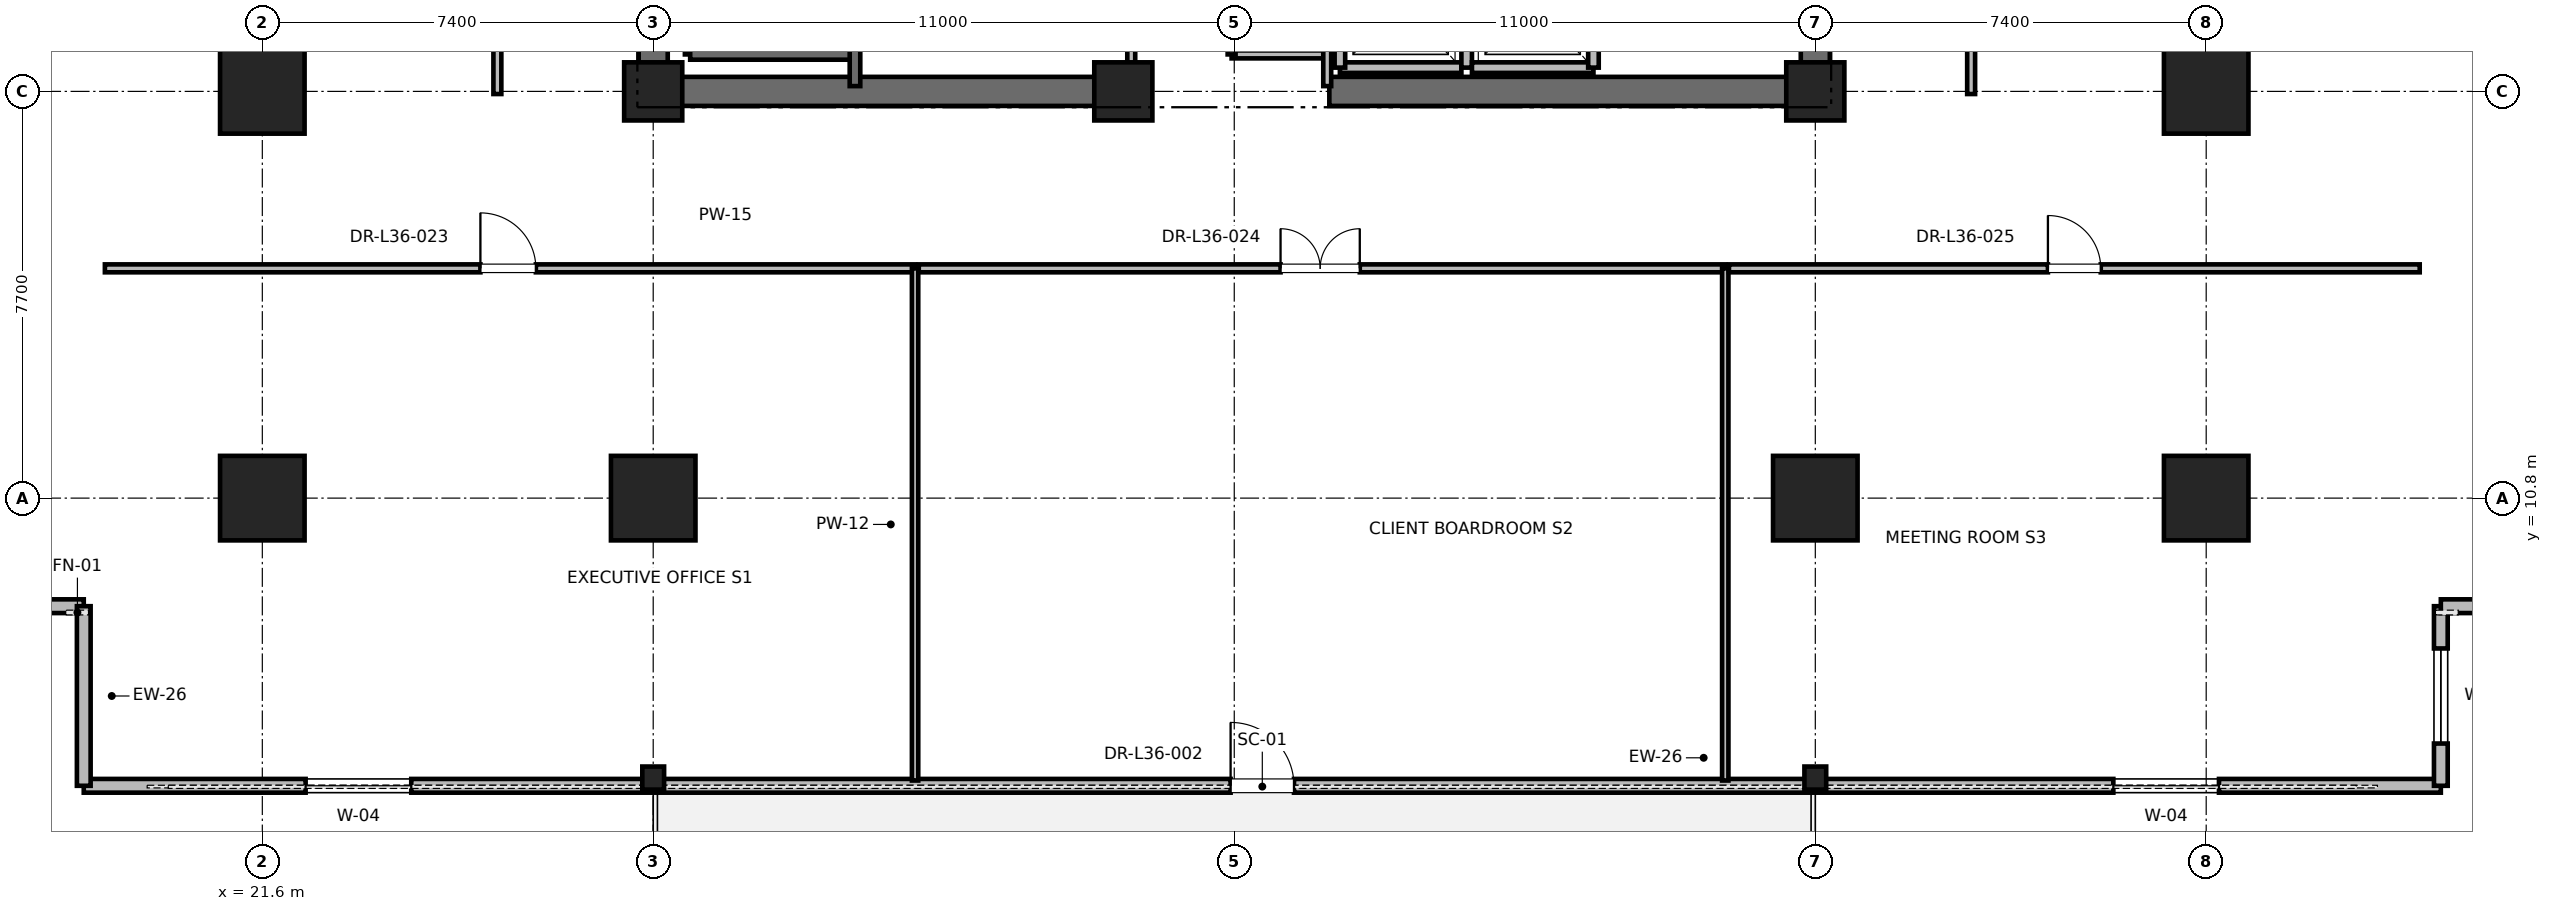
"""IFC4 building model, lengths in metres.
Left out: names, types, materials, properties, quantities, classifications, styles, units other than length and angle.
Written with IfcOpenShell. Run it as: python <this file> out.ifc"""

import sys

from ifc_helpers import new_model, si_unit, direction, frame, frame_2d, origin, origin_2d, place, context, subcontext, project, spatial, rectangle, i_section, extrude, element, fill, save


model = new_model("IFC4")
c1 = context("Model", 3, precision=1e-05, world=origin(), true_north=direction((0.0, 1.0)))
c2 = subcontext(c1, "Body", "Model", "MODEL_VIEW")
j1 = project(units=[si_unit("LENGTHUNIT", "METRE"), si_unit("PLANEANGLEUNIT", "RADIAN")], contexts=[c1])
p1 = place(None, origin())
s1 = spatial("IfcSite", under=j1, at=p1, CompositionType="ELEMENT")
p2 = place(p1, origin())
s2 = spatial("IfcBuilding", under=s1, at=p2, CompositionType="ELEMENT")
p3 = place(p2, frame((0.0, 0.0, 156.4)))
s3 = spatial("IfcBuildingStorey", under=s2, at=p3, CompositionType="ELEMENT", Elevation=156.4)
for number, where, z_axis, x_axis in (
    (1, (29.0, 10.8, 0.0), (0.0, 0.0, 1.0), (1.0, 0.0, 0.0)),
    (2, (51.0, 10.8, 0.0), (0.0, 0.0, 1.0), (1.0, 0.0, 0.0)),
    (3, (21.6, 18.5, 0.0), (0.0, 0.0, 1.0), (1.0, 0.0, 0.0)),
    (4, (58.4, 18.5, 0.0), (0.0, 0.0, 1.0), (1.0, 0.0, 0.0)),
    (5, (21.6, 10.8, 0.0), (0.0, 0.0, 1.0), (1.0, 0.0, 0.0)),
    (6, (58.4, 10.8, 0.0), (0.0, 0.0, 1.0), (1.0, 0.0, 0.0)),
):
    element("IfcColumn", number, at=place(p3, frame(where, z_axis=z_axis, x_axis=x_axis)), inside=s3, PredefinedType="COLUMN", context=c2, shape_type="SweptSolid", body=[
        extrude(rectangle(XDim=1.6, YDim=1.6, at=origin_2d()), origin(), (0.0, 0.0, 1.0), 4.0),
    ])
for number, where, z_axis, x_axis in (
    (7, (29.0, 5.5, 0.0), (0.0, 0.0, 1.0), (1.0, 0.0, 0.0)),
    (8, (51.0, 5.5, 0.0), (0.0, 0.0, 1.0), (1.0, 0.0, 0.0)),
):
    element("IfcColumn", number, at=place(p3, frame(where, z_axis=z_axis, x_axis=x_axis)), inside=s3, PredefinedType="COLUMN", context=c2, shape_type="SweptSolid", body=[
        extrude(i_section(OverallWidth=0.412, OverallDepth=0.437, WebThickness=0.036, FlangeThickness=0.058, FilletRadius=0.015, at=origin_2d()), origin(), (0.0, 0.0, 1.0), 4.0),
    ])
for number, where, z_axis, x_axis in (
    (9, (29.0, 18.5, 0.0), (0.0, 0.0, 1.0), (1.0, 0.0, 0.0)),
    (10, (51.0, 18.5, 0.0), (0.0, 0.0, 1.0), (1.0, 0.0, 0.0)),
    (11, (37.9, 18.5, 0.0), (0.0, 0.0, 1.0), (1.0, 0.0, 0.0)),
):
    element("IfcColumn", number, at=place(p3, frame(where, z_axis=z_axis, x_axis=x_axis)), inside=s3, PredefinedType="PILASTER", context=c2, shape_type="SweptSolid", body=[
        extrude(rectangle(XDim=1.1, YDim=1.1, at=origin_2d()), origin(), (0.0, 0.0, 1.0), 4.0),
    ])
for number, where, z_axis, x_axis in (
    (12, (29.0, 18.5, 0.0), (0.0, 0.0, 1.0), (1.0, 0.0, 0.0)),
    (13, (41.8, 18.5, 0.0), (0.0, 0.0, 1.0), (1.0, 0.0, 0.0)),
):
    element("IfcWall", number, at=place(p3, frame(where, z_axis=z_axis, x_axis=x_axis)), inside=s3, PredefinedType="SHEAR", context=c2, shape_type="SweptSolid", body=[
        extrude(rectangle(XDim=9.2, YDim=0.55, at=frame_2d((4.6, 0.0))), origin(), (0.0, 0.0, 1.0), 3.775),
    ])
p4 = place(p3, frame((29.0, 18.5, 0.0), z_axis=(0.0, 0.0, 1.0), x_axis=(0.0, 1.0, 0.0)))
e14 = element("IfcWall", 14, at=p4, inside=s3, PredefinedType="SHEAR", context=c2, shape_type="SweptSolid", body=[
    extrude(rectangle(XDim=8.8, YDim=0.55, at=frame_2d((4.4, 0.0))), origin(), (0.0, 0.0, 1.0), 3.775),
])
p5 = place(p3, frame((51.0, 18.5, 0.0), z_axis=(0.0, 0.0, 1.0), x_axis=(0.0, 1.0, 0.0)))
e15 = element("IfcWall", 15, at=p5, inside=s3, PredefinedType="SHEAR", context=c2, shape_type="SweptSolid", body=[
    extrude(rectangle(XDim=5.8, YDim=0.55, at=frame_2d((2.9, 0.0))), origin(), (0.0, 0.0, 1.0), 3.775),
])
p6 = place(p3, frame((18.22, 5.354, 0.0), z_axis=(0.0, 0.0, 1.0), x_axis=(1.0, 0.0, 0.0)))
e16 = element("IfcWall", 16, at=p6, inside=s3, PredefinedType="PARAPET", context=c2, shape_type="SweptSolid", body=[
    extrude(rectangle(XDim=44.622, YDim=0.26, at=frame_2d((22.311, 0.0))), origin(), (0.0, 0.0, 1.0), 2.97),
])
p7 = place(p6, frame((4.2, 0.0, 0.85)))
e17 = element("IfcOpeningElement", 17, at=p7, cuts=e16, PredefinedType="OPENING", context=c2, shape_type="SweptSolid", body=[
    extrude(rectangle(XDim=2.0, YDim=2.3, at=frame_2d((1.0, 1.15))), frame((0.0, 0.13, 0.0), z_axis=(0.0, -1.0, 0.0), x_axis=(1.0, 0.0, 0.0)), (0.0, 0.0, 1.0), 0.26),
])
p8 = place(p6, frame((21.711, 0.0, 0.0)))
e18 = element("IfcOpeningElement", 18, at=p8, cuts=e16, PredefinedType="OPENING", context=c2, shape_type="SweptSolid", body=[
    extrude(rectangle(XDim=1.2, YDim=2.2, at=frame_2d((0.6, 1.1))), frame((0.0, 0.13, 0.0), z_axis=(0.0, -1.0, 0.0), x_axis=(1.0, 0.0, 0.0)), (0.0, 0.0, 1.0), 0.26),
])
p9 = place(p6, frame((38.422, 0.0, 0.85)))
e19 = element("IfcOpeningElement", 19, at=p9, cuts=e16, PredefinedType="OPENING", context=c2, shape_type="SweptSolid", body=[
    extrude(rectangle(XDim=2.0, YDim=2.3, at=frame_2d((1.0, 1.15))), frame((0.0, 0.13, 0.0), z_axis=(0.0, -1.0, 0.0), x_axis=(1.0, 0.0, 0.0)), (0.0, 0.0, 1.0), 0.26),
])
p10 = place(p3, frame((14.42, 8.754, 0.0), z_axis=(0.0, 0.0, 1.0), x_axis=(1.0, 0.0, 0.0)))
e20 = element("IfcWall", 20, at=p10, inside=s3, PredefinedType="PARAPET", context=c2, shape_type="SweptSolid", body=[
    extrude(rectangle(XDim=3.8, YDim=0.26, at=frame_2d((1.9, 0.0))), origin(), (0.0, 0.0, 1.0), 3.775),
])
p11 = place(p10, frame((1.0, 0.0, 0.85)))
e21 = element("IfcOpeningElement", 21, at=p11, cuts=e20, PredefinedType="OPENING", context=c2, shape_type="SweptSolid", body=[
    extrude(rectangle(XDim=1.8, YDim=2.2, at=frame_2d((0.9, 1.1))), frame((0.0, 0.13, 0.0), z_axis=(0.0, -1.0, 0.0), x_axis=(1.0, 0.0, 0.0)), (0.0, 0.0, 1.0), 0.26),
])
p12 = place(p3, frame((18.22, 8.754, 0.0), z_axis=(0.0, 0.0, 1.0), x_axis=(0.0, -1.0, 0.0)))
e22 = element("IfcWall", 22, at=p12, inside=s3, PredefinedType="PARAPET", context=c2, shape_type="SweptSolid", body=[
    extrude(rectangle(XDim=3.4, YDim=0.26, at=frame_2d((1.7, 0.0))), origin(), (0.0, 0.0, 1.0), 3.775),
])
p13 = place(p3, frame((62.842, 5.354, 0.0), z_axis=(0.0, 0.0, 1.0), x_axis=(0.0, 1.0, 0.0)))
e23 = element("IfcWall", 23, at=p13, inside=s3, PredefinedType="PARAPET", context=c2, shape_type="SweptSolid", body=[
    extrude(rectangle(XDim=3.4, YDim=0.26, at=frame_2d((1.7, 0.0))), origin(), (0.0, 0.0, 1.0), 3.775),
])
p14 = place(p13, frame((0.8, 0.0, 0.85)))
e24 = element("IfcOpeningElement", 24, at=p14, cuts=e23, PredefinedType="OPENING", context=c2, shape_type="SweptSolid", body=[
    extrude(rectangle(XDim=1.8, YDim=2.2, at=frame_2d((0.9, 1.1))), frame((0.0, 0.13, 0.0), z_axis=(0.0, -1.0, 0.0), x_axis=(1.0, 0.0, 0.0)), (0.0, 0.0, 1.0), 0.26),
])
p15 = place(p3, frame((62.842, 8.754, 0.0), z_axis=(0.0, 0.0, 1.0), x_axis=(1.0, 0.0, 0.0)))
e25 = element("IfcWall", 25, at=p15, inside=s3, PredefinedType="PARAPET", context=c2, shape_type="SweptSolid", body=[
    extrude(rectangle(XDim=3.8, YDim=0.26, at=frame_2d((1.9, 0.0))), origin(), (0.0, 0.0, 1.0), 3.775),
])
p16 = place(p3, frame((29.7, 19.2, 0.0), z_axis=(0.0, 0.0, 1.0), x_axis=(0.0, 1.0, 0.0)))
e26 = element("IfcWall", 26, at=p16, inside=s3, PredefinedType="SOLIDWALL", context=c2, shape_type="SweptSolid", body=[
    extrude(rectangle(XDim=8.15, YDim=0.2, at=frame_2d((4.075, 0.0))), origin(), (0.0, 0.0, 1.0), 3.775),
])
p17 = place(p3, frame((29.7, 19.2, 0.0), z_axis=(0.0, 0.0, 1.0), x_axis=(1.0, 0.0, 0.0)))
e27 = element("IfcWall", 27, at=p17, inside=s3, PredefinedType="SOLIDWALL", context=c2, shape_type="SweptSolid", body=[
    extrude(rectangle(XDim=3.12, YDim=0.2, at=frame_2d((1.56, 0.0))), origin(), (0.0, 0.0, 1.0), 3.775),
])
p18 = place(p3, frame((32.82, 18.6, 0.0), z_axis=(0.0, 0.0, 1.0), x_axis=(0.0, 1.0, 0.0)))
e28 = element("IfcWall", 28, at=p18, inside=s3, PredefinedType="SOLIDWALL", context=c2, shape_type="SweptSolid", body=[
    extrude(rectangle(XDim=8.78, YDim=0.2, at=frame_2d((4.39, 0.0))), origin(), (0.0, 0.0, 1.0), 3.775),
])
p19 = place(p3, frame((42.0, 18.95, 0.0), z_axis=(0.0, 0.0, 1.0), x_axis=(1.0, 0.0, 0.0)))
e29 = element("IfcWall", 29, at=p19, inside=s3, PredefinedType="SOLIDWALL", context=c2, shape_type="SweptSolid", body=[
    extrude(rectangle(XDim=2.3, YDim=0.2, at=frame_2d((1.15, 0.0))), origin(), (0.0, 0.0, 1.0), 2.755),
])
p20 = place(p3, frame((42.0, 21.55, 0.0), z_axis=(0.0, 0.0, 1.0), x_axis=(0.0, -1.0, 0.0)))
e30 = element("IfcWall", 30, at=p20, inside=s3, PredefinedType="SOLIDWALL", context=c2, shape_type="SweptSolid", body=[
    extrude(rectangle(XDim=2.6, YDim=0.2, at=frame_2d((1.3, 0.0))), origin(), (0.0, 0.0, 1.0), 2.755),
])
p21 = place(p3, frame((44.4, 18.95, 0.0), z_axis=(0.0, 0.0, 1.0), x_axis=(0.0, 1.0, 0.0)))
e31 = element("IfcWall", 31, at=p21, inside=s3, PredefinedType="SOLIDWALL", context=c2, shape_type="SweptSolid", body=[
    extrude(rectangle(XDim=2.6, YDim=0.2, at=frame_2d((1.3, 0.0))), origin(), (0.0, 0.0, 1.0), 3.775),
])
p22 = place(p3, frame((44.5, 18.95, 0.0), z_axis=(0.0, 0.0, 1.0), x_axis=(1.0, 0.0, 0.0)))
e32 = element("IfcWall", 32, at=p22, inside=s3, PredefinedType="SOLIDWALL", context=c2, shape_type="SweptSolid", body=[
    extrude(rectangle(XDim=2.3, YDim=0.2, at=frame_2d((1.15, 0.0))), origin(), (0.0, 0.0, 1.0), 3.775),
])
p23 = place(p3, frame((46.8, 18.95, 0.0), z_axis=(0.0, 0.0, 1.0), x_axis=(0.0, 1.0, 0.0)))
e33 = element("IfcWall", 33, at=p23, inside=s3, PredefinedType="SOLIDWALL", context=c2, shape_type="SweptSolid", body=[
    extrude(rectangle(XDim=2.6, YDim=0.2, at=frame_2d((1.3, 0.0))), origin(), (0.0, 0.0, 1.0), 3.775),
])
p24 = place(p3, frame((39.95, 19.2, 0.0), z_axis=(0.0, 0.0, 1.0), x_axis=(1.0, 0.0, 0.0)))
e34 = element("IfcWall", 34, at=p24, inside=s3, PredefinedType="PARTITIONING", context=c2, shape_type="SweptSolid", body=[
    extrude(rectangle(XDim=1.81, YDim=0.15, at=frame_2d((0.905, 0.0))), origin(), (0.0, 0.0, 1.0), 2.85),
])
p25 = place(p3, frame((41.76, 18.6, 0.0), z_axis=(0.0, 0.0, 1.0), x_axis=(0.0, 1.0, 0.0)))
e35 = element("IfcWall", 35, at=p25, inside=s3, PredefinedType="PARTITIONING", context=c2, shape_type="SweptSolid", body=[
    extrude(rectangle(XDim=3.6, YDim=0.15, at=frame_2d((1.8, 0.0))), origin(), (0.0, 0.0, 1.0), 2.755),
])
p26 = place(p3, frame((39.95, 19.2, 0.0), z_axis=(0.0, 0.0, 1.0), x_axis=(0.0, 1.0, 0.0)))
e36 = element("IfcWall", 36, at=p26, inside=s3, PredefinedType="PARTITIONING", context=c2, shape_type="SweptSolid", body=[
    extrude(rectangle(XDim=3.0, YDim=0.15, at=frame_2d((1.5, 0.0))), origin(), (0.0, 0.0, 1.0), 2.85),
])
p27 = place(p26, frame((1.05, 0.0, 0.0)))
e37 = element("IfcOpeningElement", 37, at=p27, cuts=e36, PredefinedType="OPENING", context=c2, shape_type="SweptSolid", body=[
    extrude(rectangle(XDim=0.9, YDim=2.1, at=frame_2d((0.45, 1.05))), frame((0.0, 0.075, 0.0), z_axis=(0.0, -1.0, 0.0), x_axis=(1.0, 0.0, 0.0)), (0.0, 0.0, 1.0), 0.15),
])
p28 = place(p3, frame((38.05, 18.6, 0.0), z_axis=(0.0, 0.0, 1.0), x_axis=(0.0, 1.0, 0.0)))
e38 = element("IfcWall", 38, at=p28, inside=s3, PredefinedType="PARTITIONING", context=c2, shape_type="SweptSolid", body=[
    extrude(rectangle(XDim=4.46, YDim=0.15, at=frame_2d((2.23, 0.0))), origin(), (0.0, 0.0, 1.0), 2.755),
])
p29 = place(p28, frame((1.73, 0.0, 0.0)))
e39 = element("IfcOpeningElement", 39, at=p29, cuts=e38, PredefinedType="OPENING", context=c2, shape_type="SweptSolid", body=[
    extrude(rectangle(XDim=1.0, YDim=2.15, at=frame_2d((0.5, 1.075))), frame((0.0, 0.075, 0.0), z_axis=(0.0, -1.0, 0.0), x_axis=(1.0, 0.0, 0.0)), (0.0, 0.0, 1.0), 0.15),
])
p30 = place(p3, frame((18.62, 15.15, 0.0), z_axis=(0.0, 0.0, 1.0), x_axis=(1.0, 0.0, 0.0)))
e40 = element("IfcWall", 40, at=p30, inside=s3, PredefinedType="PARTITIONING", context=c2, shape_type="SweptSolid", body=[
    extrude(rectangle(XDim=15.338, YDim=0.15, at=frame_2d((7.669, 0.0))), origin(), (0.0, 0.0, 1.0), 2.85),
])
p31 = place(p30, frame((7.109, 0.0, 0.0)))
e41 = element("IfcOpeningElement", 41, at=p31, cuts=e40, PredefinedType="OPENING", context=c2, shape_type="SweptSolid", body=[
    extrude(rectangle(XDim=1.05, YDim=2.2, at=frame_2d((0.525, 1.1))), frame((0.0, 0.075, 0.0), z_axis=(0.0, -1.0, 0.0), x_axis=(1.0, 0.0, 0.0)), (0.0, 0.0, 1.0), 0.15),
])
p32 = place(p3, frame((33.958, 5.454, 0.0), z_axis=(0.0, 0.0, 1.0), x_axis=(0.0, 1.0, 0.0)))
e42 = element("IfcWall", 42, at=p32, inside=s3, PredefinedType="PARTITIONING", context=c2, shape_type="SweptSolid", body=[
    extrude(rectangle(XDim=9.696, YDim=0.12, at=frame_2d((4.848, 0.0))), origin(), (0.0, 0.0, 1.0), 2.405),
])
p33 = place(p3, frame((34.028, 15.15, 0.0), z_axis=(0.0, 0.0, 1.0), x_axis=(1.0, 0.0, 0.0)))
e43 = element("IfcWall", 43, at=p33, inside=s3, PredefinedType="PARTITIONING", context=c2, shape_type="SweptSolid", body=[
    extrude(rectangle(XDim=15.268, YDim=0.15, at=frame_2d((7.634, 0.0))), origin(), (0.0, 0.0, 1.0), 2.85),
])
p34 = place(p33, frame((6.849, 0.0, 0.0)))
e44 = element("IfcOpeningElement", 44, at=p34, cuts=e43, PredefinedType="OPENING", context=c2, shape_type="SweptSolid", body=[
    extrude(rectangle(XDim=1.5, YDim=2.25, at=frame_2d((0.75, 1.125))), frame((0.0, 0.075, 0.0), z_axis=(0.0, -1.0, 0.0), x_axis=(1.0, 0.0, 0.0)), (0.0, 0.0, 1.0), 0.15),
])
p35 = place(p3, frame((49.295, 5.454, 0.0), z_axis=(0.0, 0.0, 1.0), x_axis=(0.0, 1.0, 0.0)))
e45 = element("IfcWall", 45, at=p35, inside=s3, PredefinedType="PARTITIONING", context=c2, shape_type="SweptSolid", body=[
    extrude(rectangle(XDim=9.696, YDim=0.12, at=frame_2d((4.848, 0.0))), origin(), (0.0, 0.0, 1.0), 2.405),
])
p36 = place(p3, frame((49.365, 15.15, 0.0), z_axis=(0.0, 0.0, 1.0), x_axis=(1.0, 0.0, 0.0)))
e46 = element("IfcWall", 46, at=p36, inside=s3, PredefinedType="PARTITIONING", context=c2, shape_type="SweptSolid", body=[
    extrude(rectangle(XDim=13.077, YDim=0.15, at=frame_2d((6.538, 0.0))), origin(), (0.0, 0.0, 1.0), 2.85),
])
p37 = place(p36, frame((6.038, 0.0, 0.0)))
e47 = element("IfcOpeningElement", 47, at=p37, cuts=e46, PredefinedType="OPENING", context=c2, shape_type="SweptSolid", body=[
    extrude(rectangle(XDim=1.0, YDim=2.15, at=frame_2d((0.5, 1.075))), frame((0.0, 0.075, 0.0), z_axis=(0.0, -1.0, 0.0), x_axis=(1.0, 0.0, 0.0)), (0.0, 0.0, 1.0), 0.15),
])
p38 = place(p3, frame((26.05, 18.45, 0.0), z_axis=(0.0, 0.0, 1.0), x_axis=(0.0, 1.0, 0.0)))
e48 = element("IfcWall", 48, at=p38, inside=s3, PredefinedType="PARTITIONING", context=c2, shape_type="SweptSolid", body=[
    extrude(rectangle(XDim=18.1, YDim=0.15, at=frame_2d((9.05, 0.0))), origin(), (0.0, 0.0, 1.0), 2.85),
])
p39 = place(p38, frame((8.55, 0.0, 0.0)))
e49 = element("IfcOpeningElement", 49, at=p39, cuts=e48, PredefinedType="OPENING", context=c2, shape_type="SweptSolid", body=[
    extrude(rectangle(XDim=1.0, YDim=2.15, at=frame_2d((0.5, 1.075))), frame((0.0, 0.075, 0.0), z_axis=(0.0, -1.0, 0.0), x_axis=(1.0, 0.0, 0.0)), (0.0, 0.0, 1.0), 0.15),
])
p40 = place(p3, frame((53.95, 18.45, 0.0), z_axis=(0.0, 0.0, 1.0), x_axis=(0.0, 1.0, 0.0)))
e50 = element("IfcWall", 50, at=p40, inside=s3, PredefinedType="PARTITIONING", context=c2, shape_type="SweptSolid", body=[
    extrude(rectangle(XDim=18.1, YDim=0.15, at=frame_2d((9.05, 0.0))), origin(), (0.0, 0.0, 1.0), 2.85),
])
p41 = place(p40, frame((8.55, 0.0, 0.0)))
e51 = element("IfcOpeningElement", 51, at=p41, cuts=e50, PredefinedType="OPENING", context=c2, shape_type="SweptSolid", body=[
    extrude(rectangle(XDim=1.0, YDim=2.15, at=frame_2d((0.5, 1.075))), frame((0.0, 0.075, 0.0), z_axis=(0.0, -1.0, 0.0), x_axis=(1.0, 0.0, 0.0)), (0.0, 0.0, 1.0), 0.15),
])
p42 = place(p7, origin())
e52 = element("IfcWindow", 52, at=p42, inside=s3, PartitioningType="SINGLE_PANEL", PredefinedType="WINDOW", context=c2, shape_type="SweptSolid", body=[
    extrude(rectangle(XDim=2.0, YDim=2.3, at=frame_2d((1.0, 1.15))), frame((0.0, 0.03, 0.0), z_axis=(0.0, -1.0, 0.0), x_axis=(1.0, 0.0, 0.0)), (0.0, 0.0, 1.0), 0.06),
])
fill(e17, e52)
p43 = place(p8, origin())
e53 = element("IfcDoor", 53, at=p43, inside=s3, OperationType="SINGLE_SWING_LEFT", PredefinedType="DOOR", context=c2, shape_type="SweptSolid", body=[
    extrude(rectangle(XDim=1.2, YDim=2.2, at=frame_2d((0.6, 1.1))), frame((0.0, 0.025, 0.0), z_axis=(0.0, -1.0, 0.0), x_axis=(1.0, 0.0, 0.0)), (0.0, 0.0, 1.0), 0.05),
])
fill(e18, e53)
p44 = place(p9, origin())
e54 = element("IfcWindow", 54, at=p44, inside=s3, PartitioningType="SINGLE_PANEL", PredefinedType="WINDOW", context=c2, shape_type="SweptSolid", body=[
    extrude(rectangle(XDim=2.0, YDim=2.3, at=frame_2d((1.0, 1.15))), frame((0.0, 0.03, 0.0), z_axis=(0.0, -1.0, 0.0), x_axis=(1.0, 0.0, 0.0)), (0.0, 0.0, 1.0), 0.06),
])
fill(e19, e54)
p45 = place(p14, origin())
e55 = element("IfcWindow", 55, at=p45, inside=s3, PartitioningType="SINGLE_PANEL", PredefinedType="WINDOW", context=c2, shape_type="SweptSolid", body=[
    extrude(rectangle(XDim=1.8, YDim=2.2, at=frame_2d((0.9, 1.1))), frame((0.0, 0.03, 0.0), z_axis=(0.0, -1.0, 0.0), x_axis=(1.0, 0.0, 0.0)), (0.0, 0.0, 1.0), 0.06),
])
fill(e24, e55)
p46 = place(p31, origin())
e56 = element("IfcDoor", 56, at=p46, inside=s3, OperationType="SINGLE_SWING_LEFT", PredefinedType="DOOR", context=c2, shape_type="SweptSolid", body=[
    extrude(rectangle(XDim=1.05, YDim=2.2, at=frame_2d((0.525, 1.1))), frame((0.0, 0.025, 0.0), z_axis=(0.0, -1.0, 0.0), x_axis=(1.0, 0.0, 0.0)), (0.0, 0.0, 1.0), 0.05),
])
fill(e41, e56)
p47 = place(p34, origin())
e57 = element("IfcDoor", 57, at=p47, inside=s3, OperationType="DOUBLE_DOOR_SINGLE_SWING", PredefinedType="DOOR", context=c2, shape_type="SweptSolid", body=[
    extrude(rectangle(XDim=1.5, YDim=2.25, at=frame_2d((0.75, 1.125))), frame((0.0, 0.025, 0.0), z_axis=(0.0, -1.0, 0.0), x_axis=(1.0, 0.0, 0.0)), (0.0, 0.0, 1.0), 0.05),
])
fill(e44, e57)
p48 = place(p37, origin())
e58 = element("IfcDoor", 58, at=p48, inside=s3, OperationType="SINGLE_SWING_LEFT", PredefinedType="DOOR", context=c2, shape_type="SweptSolid", body=[
    extrude(rectangle(XDim=1.0, YDim=2.15, at=frame_2d((0.5, 1.075))), frame((0.0, 0.025, 0.0), z_axis=(0.0, -1.0, 0.0), x_axis=(1.0, 0.0, 0.0)), (0.0, 0.0, 1.0), 0.05),
])
fill(e47, e58)
save(model, sys.argv[1])
